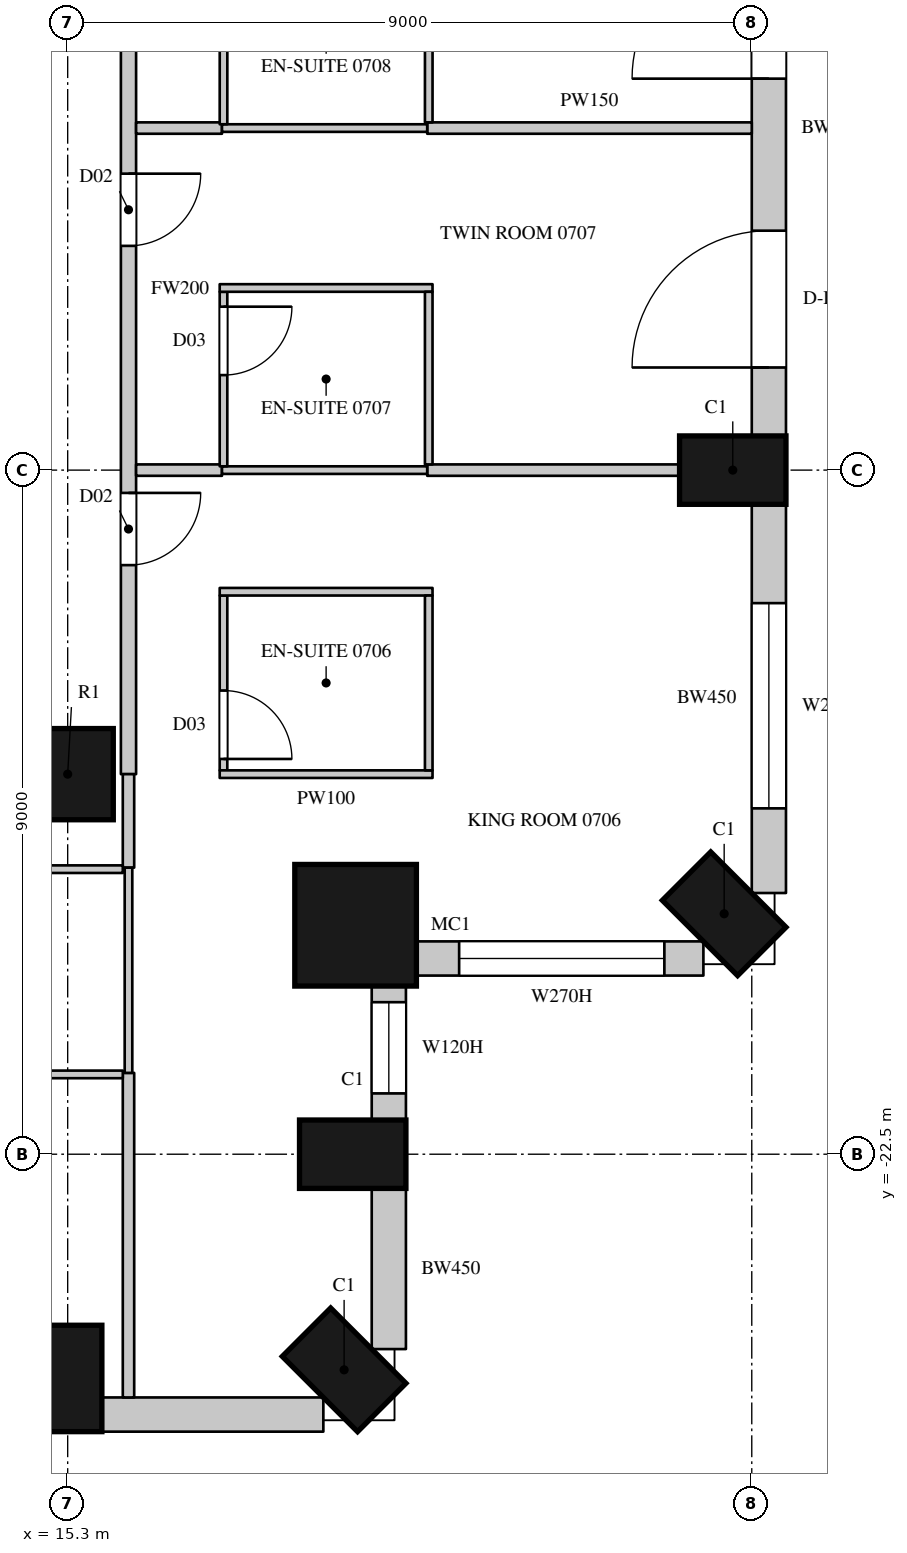
"""IFC4 building model, lengths in metres.
Left out: names, types, materials, properties, quantities, classifications, styles, units other than length and angle.
Written with IfcOpenShell. Run it as: python <this file> out.ifc"""

import sys

from ifc_helpers import new_model, si_unit, direction, frame, frame_2d, origin, origin_2d, place, context, subcontext, project, spatial, rectangle, circle, extrude, element, fill, save


model = new_model("IFC4")
c1 = context("Model", 3, precision=1e-05, world=origin(), true_north=direction((0.0, 1.0)))
c2 = subcontext(c1, "Body", "Model", "MODEL_VIEW")
j1 = project(units=[si_unit("LENGTHUNIT", "METRE"), si_unit("PLANEANGLEUNIT", "RADIAN")], contexts=[c1])
p1 = place(None, origin())
s1 = spatial("IfcSite", under=j1, at=p1, CompositionType="ELEMENT")
p2 = place(p1, origin())
s2 = spatial("IfcBuilding", under=s1, at=p2, CompositionType="ELEMENT")
p3 = place(p2, frame((0.0, 0.0, 55.5)))
s3 = spatial("IfcBuildingStorey", under=s2, at=p3, CompositionType="ELEMENT", Elevation=55.5)
for number, where, z_axis, x_axis in (
    (1, (15.3, -25.45, 0.0), (0.0, 0.0, 1.0), (1.0, 0.0, 0.0)),
    (2, (18.937, -25.337, 0.0), (0.0, 0.0, 1.0), (0.707, 0.707, 0.0)),
    (3, (19.05, -22.5, 0.0), (0.0, 0.0, 1.0), (0.0, 1.0, 0.0)),
):
    element("IfcColumn", number, at=place(p3, frame(where, z_axis=z_axis, x_axis=x_axis)), inside=s3, PredefinedType="COLUMN", context=c2, shape_type="SweptSolid", body=[
        extrude(rectangle(XDim=0.9, YDim=1.4, at=origin_2d()), origin(), (0.0, 0.0, 1.0), 3.6),
    ])
p4 = place(p3, frame((19.088, -19.488, 0.0), z_axis=(0.0, 0.0, 1.0), x_axis=(1.0, 0.0, 0.0)))
e4 = element("IfcColumn", 4, at=p4, inside=s3, PredefinedType="COLUMN", context=c2, shape_type="SweptSolid", body=[
    extrude(circle(Radius=0.8, at=origin_2d()), origin(), (0.0, 0.0, 1.0), 3.6),
])
for number, where, z_axis, x_axis in (
    (5, (23.937, -19.337, 0.0), (0.0, 0.0, 1.0), (0.707, 0.707, 0.0)),
    (6, (24.05, -13.5, 0.0), (0.0, 0.0, 1.0), (0.0, 1.0, 0.0)),
):
    element("IfcColumn", number, at=place(p3, frame(where, z_axis=z_axis, x_axis=x_axis)), inside=s3, PredefinedType="COLUMN", context=c2, shape_type="SweptSolid", body=[
        extrude(rectangle(XDim=0.9, YDim=1.4, at=origin_2d()), origin(), (0.0, 0.0, 1.0), 3.6),
    ])
p5 = place(p3, frame((15.3, -17.5, 0.0), z_axis=(0.0, 0.0, 1.0), x_axis=(1.0, 0.0, 0.0)))
e7 = element("IfcColumn", 7, at=p5, inside=s3, PredefinedType="COLUMN", context=c2, shape_type="SweptSolid", body=[
    extrude(circle(Radius=0.6, at=origin_2d()), origin(), (0.0, 0.0, 1.0), 3.6),
])
p6 = place(p3, frame((15.75, -25.925, 0.0), z_axis=(0.0, 0.0, 1.0), x_axis=(1.0, 0.0, 0.0)))
e8 = element("IfcWall", 8, at=p6, inside=s3, PredefinedType="SOLIDWALL", context=c2, shape_type="SweptSolid", body=[
    extrude(rectangle(XDim=2.914, YDim=0.45, at=frame_2d((1.457, 0.0))), origin(), (0.0, 0.0, 1.0), 3.3),
])
p7 = place(p3, frame((19.525, -25.064, 0.0), z_axis=(0.0, 0.0, 1.0), x_axis=(0.0, 1.0, 0.0)))
e9 = element("IfcWall", 9, at=p7, inside=s3, PredefinedType="SOLIDWALL", context=c2, shape_type="SweptSolid", body=[
    extrude(rectangle(XDim=2.114, YDim=0.45, at=frame_2d((1.057, 0.0))), origin(), (0.0, 0.0, 1.0), 3.3),
])
p8 = place(p3, frame((19.525, -22.05, 0.0), z_axis=(0.0, 0.0, 1.0), x_axis=(0.0, 1.0, 0.0)))
e10 = element("IfcWall", 10, at=p8, inside=s3, PredefinedType="SOLIDWALL", context=c2, shape_type="SweptSolid", body=[
    extrude(rectangle(XDim=1.792, YDim=0.45, at=frame_2d((0.896, 0.0))), origin(), (0.0, 0.0, 1.0), 3.3),
])
p9 = place(p8, frame((0.35, 0.0, 1.05)))
e11 = element("IfcOpeningElement", 11, at=p9, cuts=e10, PredefinedType="OPENING", context=c2, shape_type="SweptSolid", body=[
    extrude(rectangle(XDim=1.2, YDim=2.0, at=frame_2d((0.6, 1.0))), frame((0.0, 0.235, 0.0), z_axis=(0.0, -1.0, 0.0), x_axis=(1.0, 0.0, 0.0)), (0.0, 0.0, 1.0), 0.47),
])
p10 = place(p3, frame((19.858, -19.925, 0.0), z_axis=(0.0, 0.0, 1.0), x_axis=(1.0, 0.0, 0.0)))
e12 = element("IfcWall", 12, at=p10, inside=s3, PredefinedType="SOLIDWALL", context=c2, shape_type="SweptSolid", body=[
    extrude(rectangle(XDim=3.805, YDim=0.45, at=frame_2d((1.903, 0.0))), origin(), (0.0, 0.0, 1.0), 3.3),
])
p11 = place(p10, frame((0.592, 0.0, 1.05)))
e13 = element("IfcOpeningElement", 13, at=p11, cuts=e12, PredefinedType="OPENING", context=c2, shape_type="SweptSolid", body=[
    extrude(rectangle(XDim=2.7, YDim=2.0, at=frame_2d((1.35, 1.0))), frame((0.0, 0.235, 0.0), z_axis=(0.0, -1.0, 0.0), x_axis=(1.0, 0.0, 0.0)), (0.0, 0.0, 1.0), 0.47),
])
p12 = place(p3, frame((24.525, -19.064, 0.0), z_axis=(0.0, 0.0, 1.0), x_axis=(0.0, 1.0, 0.0)))
e14 = element("IfcWall", 14, at=p12, inside=s3, PredefinedType="SOLIDWALL", context=c2, shape_type="SweptSolid", body=[
    extrude(rectangle(XDim=5.114, YDim=0.45, at=frame_2d((2.557, 0.0))), origin(), (0.0, 0.0, 1.0), 3.3),
])
p13 = place(p12, frame((1.114, 0.0, 1.05)))
e15 = element("IfcOpeningElement", 15, at=p13, cuts=e14, PredefinedType="OPENING", context=c2, shape_type="SweptSolid", body=[
    extrude(rectangle(XDim=2.7, YDim=2.0, at=frame_2d((1.35, 1.0))), frame((0.0, 0.235, 0.0), z_axis=(0.0, -1.0, 0.0), x_axis=(1.0, 0.0, 0.0)), (0.0, 0.0, 1.0), 0.47),
])
p14 = place(p3, frame((24.525, -13.05, 0.0), z_axis=(0.0, 0.0, 1.0), x_axis=(0.0, 1.0, 0.0)))
e16 = element("IfcWall", 16, at=p14, inside=s3, PredefinedType="SOLIDWALL", context=c2, shape_type="SweptSolid", body=[
    extrude(rectangle(XDim=8.1, YDim=0.45, at=frame_2d((4.05, 0.0))), origin(), (0.0, 0.0, 1.0), 3.3),
])
p15 = place(p14, frame((0.9, 0.0, 0.0)))
e17 = element("IfcOpeningElement", 17, at=p15, cuts=e16, PredefinedType="OPENING", context=c2, shape_type="SweptSolid", body=[
    extrude(rectangle(XDim=1.8, YDim=2.4, at=frame_2d((0.9, 1.2))), frame((0.0, 0.235, 0.0), z_axis=(0.0, -1.0, 0.0), x_axis=(1.0, 0.0, 0.0)), (0.0, 0.0, 1.0), 0.47),
])
p16 = place(p14, frame((4.7, 0.0, 0.0)))
e18 = element("IfcOpeningElement", 18, at=p16, cuts=e16, PredefinedType="OPENING", context=c2, shape_type="SweptSolid", body=[
    extrude(rectangle(XDim=1.8, YDim=2.4, at=frame_2d((0.9, 1.2))), frame((0.0, 0.235, 0.0), z_axis=(0.0, -1.0, 0.0), x_axis=(1.0, 0.0, 0.0)), (0.0, 0.0, 1.0), 0.47),
])
p17 = place(p14, frame((6.7, 0.0, 1.05)))
e19 = element("IfcOpeningElement", 19, at=p17, cuts=e16, PredefinedType="OPENING", context=c2, shape_type="SweptSolid", body=[
    extrude(rectangle(XDim=1.2, YDim=2.0, at=frame_2d((0.6, 1.0))), frame((0.0, 0.235, 0.0), z_axis=(0.0, -1.0, 0.0), x_axis=(1.0, 0.0, 0.0)), (0.0, 0.0, 1.0), 0.47),
])
p18 = place(p3, frame((16.1, -17.5, 0.0), z_axis=(0.0, 0.0, 1.0), x_axis=(0.0, 1.0, 0.0)))
e20 = element("IfcWall", 20, at=p18, inside=s3, PredefinedType="PARTITIONING", context=c2, shape_type="SweptSolid", body=[
    extrude(rectangle(XDim=12.75, YDim=0.2, at=frame_2d((6.375, 0.0))), origin(), (0.0, 0.0, 1.0), 3.3),
])
p19 = place(p18, frame((2.75, 0.0, 0.0)))
e21 = element("IfcOpeningElement", 21, at=p19, cuts=e20, PredefinedType="OPENING", context=c2, shape_type="SweptSolid", body=[
    extrude(rectangle(XDim=0.95, YDim=2.2, at=frame_2d((0.475, 1.1))), frame((0.0, 0.11, 0.0), z_axis=(0.0, -1.0, 0.0), x_axis=(1.0, 0.0, 0.0)), (0.0, 0.0, 1.0), 0.22),
])
p20 = place(p18, frame((6.95, 0.0, 0.0)))
e22 = element("IfcOpeningElement", 22, at=p20, cuts=e20, PredefinedType="OPENING", context=c2, shape_type="SweptSolid", body=[
    extrude(rectangle(XDim=0.95, YDim=2.2, at=frame_2d((0.475, 1.1))), frame((0.0, 0.11, 0.0), z_axis=(0.0, -1.0, 0.0), x_axis=(1.0, 0.0, 0.0)), (0.0, 0.0, 1.0), 0.22),
])
p21 = place(p18, frame((11.4, 0.0, 0.0)))
e23 = element("IfcOpeningElement", 23, at=p21, cuts=e20, PredefinedType="OPENING", context=c2, shape_type="SweptSolid", body=[
    extrude(rectangle(XDim=0.95, YDim=2.2, at=frame_2d((0.475, 1.1))), frame((0.0, 0.11, 0.0), z_axis=(0.0, -1.0, 0.0), x_axis=(1.0, 0.0, 0.0)), (0.0, 0.0, 1.0), 0.22),
])
p22 = place(p3, frame((16.1, -25.7, 0.0), z_axis=(0.0, 0.0, 1.0), x_axis=(0.0, 1.0, 0.0)))
e24 = element("IfcWall", 24, at=p22, inside=s3, PredefinedType="PARTITIONING", context=c2, shape_type="SweptSolid", body=[
    extrude(rectangle(XDim=4.27, YDim=0.15, at=frame_2d((2.135, 0.0))), origin(), (0.0, 0.0, 1.0), 3.3),
])
p23 = place(p3, frame((16.1, -18.73, 0.0), z_axis=(0.0, 0.0, 1.0), x_axis=(0.0, 1.0, 0.0)))
e25 = element("IfcWall", 25, at=p23, inside=s3, PredefinedType="PARTITIONING", context=c2, shape_type="SweptSolid", body=[
    extrude(rectangle(XDim=1.23, YDim=0.15, at=frame_2d((0.615, 0.0))), origin(), (0.0, 0.0, 1.0), 3.3),
])
p24 = place(p3, frame((16.2, -13.5, 0.0), z_axis=(0.0, 0.0, 1.0), x_axis=(1.0, 0.0, 0.0)))
e26 = element("IfcWall", 26, at=p24, inside=s3, PredefinedType="PARTITIONING", context=c2, shape_type="SweptSolid", body=[
    extrude(rectangle(XDim=1.13, YDim=0.15, at=frame_2d((0.565, 0.0))), origin(), (0.0, 0.0, 1.0), 3.3),
])
p25 = place(p3, frame((16.2, -9.0, 0.0), z_axis=(0.0, 0.0, 1.0), x_axis=(1.0, 0.0, 0.0)))
e27 = element("IfcWall", 27, at=p25, inside=s3, PredefinedType="PARTITIONING", context=c2, shape_type="SweptSolid", body=[
    extrude(rectangle(XDim=1.13, YDim=0.15, at=frame_2d((0.565, 0.0))), origin(), (0.0, 0.0, 1.0), 2.65),
])
p26 = place(p3, frame((20.03, -13.5, 0.0), z_axis=(0.0, 0.0, 1.0), x_axis=(1.0, 0.0, 0.0)))
e28 = element("IfcWall", 28, at=p26, inside=s3, PredefinedType="PARTITIONING", context=c2, shape_type="SweptSolid", body=[
    extrude(rectangle(XDim=3.32, YDim=0.15, at=frame_2d((1.66, 0.0))), origin(), (0.0, 0.0, 1.0), 3.3),
])
p27 = place(p3, frame((20.03, -9.0, 0.0), z_axis=(0.0, 0.0, 1.0), x_axis=(1.0, 0.0, 0.0)))
e29 = element("IfcWall", 29, at=p27, inside=s3, PredefinedType="PARTITIONING", context=c2, shape_type="SweptSolid", body=[
    extrude(rectangle(XDim=4.27, YDim=0.15, at=frame_2d((2.135, 0.0))), origin(), (0.0, 0.0, 1.0), 2.65),
])
for number, where, z_axis, x_axis in (
    (30, (13.65, -21.45, 0.0), (0.0, 0.0, 1.0), (1.0, 0.0, 0.0)),
    (31, (13.65, -18.75, 0.0), (0.0, 0.0, 1.0), (1.0, 0.0, 0.0)),
):
    element("IfcWall", number, at=place(p3, frame(where, z_axis=z_axis, x_axis=x_axis)), inside=s3, PredefinedType="PARTITIONING", context=c2, shape_type="SweptSolid", body=[
        extrude(rectangle(XDim=2.375, YDim=0.1, at=frame_2d((1.188, 0.0))), origin(), (0.0, 0.0, 1.0), 3.3),
    ])
for number, where, z_axis, x_axis in (
    (32, (16.1, -21.43, 0.0), (0.0, 0.0, 1.0), (0.0, 1.0, 0.0)),
    (33, (17.33, -13.5, 0.0), (0.0, 0.0, 1.0), (1.0, 0.0, 0.0)),
):
    element("IfcWall", number, at=place(p3, frame(where, z_axis=z_axis, x_axis=x_axis)), inside=s3, PredefinedType="PARTITIONING", context=c2, shape_type="SweptSolid", body=[
        extrude(rectangle(XDim=2.7, YDim=0.1, at=frame_2d((1.35, 0.0))), origin(), (0.0, 0.0, 1.0), 3.3),
    ])
p28 = place(p3, frame((17.33, -9.0, 0.0), z_axis=(0.0, 0.0, 1.0), x_axis=(1.0, 0.0, 0.0)))
e34 = element("IfcWall", 34, at=p28, inside=s3, PredefinedType="PARTITIONING", context=c2, shape_type="SweptSolid", body=[
    extrude(rectangle(XDim=2.7, YDim=0.1, at=frame_2d((1.35, 0.0))), origin(), (0.0, 0.0, 1.0), 2.65),
])
p29 = place(p3, frame((17.35, -17.45, 0.0), z_axis=(0.0, 0.0, 1.0), x_axis=(0.0, 1.0, 0.0)))
e35 = element("IfcWall", 35, at=p29, inside=s3, PredefinedType="PARTITIONING", context=c2, shape_type="SweptSolid", body=[
    extrude(rectangle(XDim=2.3, YDim=0.1, at=frame_2d((1.15, 0.0))), origin(), (0.0, 0.0, 1.0), 3.3),
])
p30 = place(p29, frame((0.15, 0.0, 0.0)))
e36 = element("IfcOpeningElement", 36, at=p30, cuts=e35, PredefinedType="OPENING", context=c2, shape_type="SweptSolid", body=[
    extrude(rectangle(XDim=0.9, YDim=2.2, at=frame_2d((0.45, 1.1))), frame((0.0, 0.06, 0.0), z_axis=(0.0, -1.0, 0.0), x_axis=(1.0, 0.0, 0.0)), (0.0, 0.0, 1.0), 0.12),
])
for number, where, z_axis, x_axis in (
    (37, (17.3, -17.5, 0.0), (0.0, 0.0, 1.0), (1.0, 0.0, 0.0)),
    (38, (17.3, -15.1, 0.0), (0.0, 0.0, 1.0), (1.0, 0.0, 0.0)),
):
    element("IfcWall", number, at=place(p3, frame(where, z_axis=z_axis, x_axis=x_axis)), inside=s3, PredefinedType="PARTITIONING", context=c2, shape_type="SweptSolid", body=[
        extrude(rectangle(XDim=2.8, YDim=0.1, at=frame_2d((1.4, 0.0))), origin(), (0.0, 0.0, 1.0), 3.3),
    ])
p31 = place(p3, frame((17.35, -13.45, 0.0), z_axis=(0.0, 0.0, 1.0), x_axis=(0.0, 1.0, 0.0)))
e39 = element("IfcWall", 39, at=p31, inside=s3, PredefinedType="PARTITIONING", context=c2, shape_type="SweptSolid", body=[
    extrude(rectangle(XDim=2.296, YDim=0.1, at=frame_2d((1.148, 0.0))), origin(), (0.0, 0.0, 1.0), 3.3),
])
p32 = place(p31, frame((1.2, 0.0, 0.0)))
e40 = element("IfcOpeningElement", 40, at=p32, cuts=e39, PredefinedType="OPENING", context=c2, shape_type="SweptSolid", body=[
    extrude(rectangle(XDim=0.9, YDim=2.2, at=frame_2d((0.45, 1.1))), frame((0.0, 0.06, 0.0), z_axis=(0.0, -1.0, 0.0), x_axis=(1.0, 0.0, 0.0)), (0.0, 0.0, 1.0), 0.12),
])
p33 = place(p3, frame((17.3, -11.104, 0.0), z_axis=(0.0, 0.0, 1.0), x_axis=(1.0, 0.0, 0.0)))
e41 = element("IfcWall", 41, at=p33, inside=s3, PredefinedType="PARTITIONING", context=c2, shape_type="SweptSolid", body=[
    extrude(rectangle(XDim=2.8, YDim=0.1, at=frame_2d((1.4, 0.0))), origin(), (0.0, 0.0, 1.0), 3.3),
])
p34 = place(p3, frame((17.35, -8.95, 0.0), z_axis=(0.0, 0.0, 1.0), x_axis=(0.000407580973, 0.999999916939, 0.0)))
e42 = element("IfcWall", 42, at=p34, inside=s3, PredefinedType="PARTITIONING", context=c2, shape_type="SweptSolid", body=[
    extrude(rectangle(XDim=2.396, YDim=0.1, at=frame_2d((1.198, 0.0))), origin(), (0.0, 0.0, 1.0), 3.3),
])
p35 = place(p34, frame((1.25, 0.0, 0.0)))
e43 = element("IfcOpeningElement", 43, at=p35, cuts=e42, PredefinedType="OPENING", context=c2, shape_type="SweptSolid", body=[
    extrude(rectangle(XDim=0.9, YDim=2.2, at=frame_2d((0.45, 1.1))), frame((0.0, 0.06, 0.0), z_axis=(0.0, -1.0, 0.0), x_axis=(1.0, 0.0, 0.0)), (0.0, 0.0, 1.0), 0.12),
])
p36 = place(p3, frame((20.05, -17.45, 0.0), z_axis=(0.0, 0.0, 1.0), x_axis=(0.0, 1.0, 0.0)))
e44 = element("IfcWall", 44, at=p36, inside=s3, PredefinedType="PARTITIONING", context=c2, shape_type="SweptSolid", body=[
    extrude(rectangle(XDim=2.3, YDim=0.1, at=frame_2d((1.15, 0.0))), origin(), (0.0, 0.0, 1.0), 3.3),
])
p37 = place(p3, frame((20.05, -13.425, 0.0), z_axis=(0.0, 0.0, 1.0), x_axis=(0.0, 1.0, 0.0)))
e45 = element("IfcWall", 45, at=p37, inside=s3, PredefinedType="PARTITIONING", context=c2, shape_type="SweptSolid", body=[
    extrude(rectangle(XDim=2.271, YDim=0.1, at=frame_2d((1.135, 0.0))), origin(), (0.0, 0.0, 1.0), 3.3),
])
p38 = place(p3, frame((20.05, -8.925, 0.0), z_axis=(0.0, 0.0, 1.0), x_axis=(0.000430200003, 0.999999907464, 0.0)))
e46 = element("IfcWall", 46, at=p38, inside=s3, PredefinedType="PARTITIONING", context=c2, shape_type="SweptSolid", body=[
    extrude(rectangle(XDim=2.27, YDim=0.1, at=frame_2d((1.135, 0.0))), origin(), (0.0, 0.0, 1.0), 3.3),
])
p39 = place(p9, origin())
e47 = element("IfcWindow", 47, at=p39, inside=s3, PartitioningType="SINGLE_PANEL", PredefinedType="WINDOW", context=c2, shape_type="SweptSolid", body=[
    extrude(rectangle(XDim=1.2, YDim=2.0, at=frame_2d((0.6, 1.0))), frame((0.0, 0.135, 0.0), z_axis=(0.0, -1.0, 0.0), x_axis=(1.0, 0.0, 0.0)), (0.0, 0.0, 1.0), 0.06),
])
fill(e11, e47)
p40 = place(p11, origin())
e48 = element("IfcWindow", 48, at=p40, inside=s3, PartitioningType="SINGLE_PANEL", PredefinedType="WINDOW", context=c2, shape_type="SweptSolid", body=[
    extrude(rectangle(XDim=2.7, YDim=2.0, at=frame_2d((1.35, 1.0))), frame((0.0, 0.135, 0.0), z_axis=(0.0, -1.0, 0.0), x_axis=(1.0, 0.0, 0.0)), (0.0, 0.0, 1.0), 0.06),
])
fill(e13, e48)
p41 = place(p13, origin())
e49 = element("IfcWindow", 49, at=p41, inside=s3, PartitioningType="SINGLE_PANEL", PredefinedType="WINDOW", context=c2, shape_type="SweptSolid", body=[
    extrude(rectangle(XDim=2.7, YDim=2.0, at=frame_2d((1.35, 1.0))), frame((0.0, 0.135, 0.0), z_axis=(0.0, -1.0, 0.0), x_axis=(1.0, 0.0, 0.0)), (0.0, 0.0, 1.0), 0.06),
])
fill(e15, e49)
p42 = place(p15, origin())
e50 = element("IfcDoor", 50, at=p42, inside=s3, OperationType="SLIDING_TO_LEFT", PredefinedType="DOOR", context=c2, shape_type="SweptSolid", body=[
    extrude(rectangle(XDim=1.8, YDim=2.4, at=frame_2d((0.9, 1.2))), frame((0.0, 0.13, 0.0), z_axis=(0.0, -1.0, 0.0), x_axis=(1.0, 0.0, 0.0)), (0.0, 0.0, 1.0), 0.05),
])
fill(e17, e50)
p43 = place(p16, origin())
e51 = element("IfcDoor", 51, at=p43, inside=s3, OperationType="SLIDING_TO_LEFT", PredefinedType="DOOR", context=c2, shape_type="SweptSolid", body=[
    extrude(rectangle(XDim=1.8, YDim=2.4, at=frame_2d((0.9, 1.2))), frame((0.0, 0.13, 0.0), z_axis=(0.0, -1.0, 0.0), x_axis=(1.0, 0.0, 0.0)), (0.0, 0.0, 1.0), 0.05),
])
fill(e18, e51)
p44 = place(p19, origin())
e52 = element("IfcDoor", 52, at=p44, inside=s3, OperationType="SINGLE_SWING_LEFT", PredefinedType="DOOR", context=c2, shape_type="SweptSolid", body=[
    extrude(rectangle(XDim=0.95, YDim=2.2, at=frame_2d((0.475, 1.1))), frame((0.0, 0.025, 0.0), z_axis=(0.0, -1.0, 0.0), x_axis=(1.0, 0.0, 0.0)), (0.0, 0.0, 1.0), 0.05),
])
fill(e21, e52)
p45 = place(p30, origin())
e53 = element("IfcDoor", 53, at=p45, inside=s3, OperationType="SINGLE_SWING_RIGHT", PredefinedType="DOOR", context=c2, shape_type="SweptSolid", body=[
    extrude(rectangle(XDim=0.9, YDim=2.2, at=frame_2d((0.45, 1.1))), frame((0.0, 0.025, 0.0), z_axis=(0.0, -1.0, 0.0), x_axis=(1.0, 0.0, 0.0)), (0.0, 0.0, 1.0), 0.05),
])
fill(e36, e53)
p46 = place(p20, origin())
e54 = element("IfcDoor", 54, at=p46, inside=s3, OperationType="SINGLE_SWING_LEFT", PredefinedType="DOOR", context=c2, shape_type="SweptSolid", body=[
    extrude(rectangle(XDim=0.95, YDim=2.2, at=frame_2d((0.475, 1.1))), frame((0.0, 0.025, 0.0), z_axis=(0.0, -1.0, 0.0), x_axis=(1.0, 0.0, 0.0)), (0.0, 0.0, 1.0), 0.05),
])
fill(e22, e54)
p47 = place(p32, origin())
e55 = element("IfcDoor", 55, at=p47, inside=s3, OperationType="SINGLE_SWING_LEFT", PredefinedType="DOOR", context=c2, shape_type="SweptSolid", body=[
    extrude(rectangle(XDim=0.9, YDim=2.2, at=frame_2d((0.45, 1.1))), frame((0.0, 0.025, 0.0), z_axis=(0.0, -1.0, 0.0), x_axis=(1.0, 0.0, 0.0)), (0.0, 0.0, 1.0), 0.05),
])
fill(e40, e55)
save(model, sys.argv[1])
